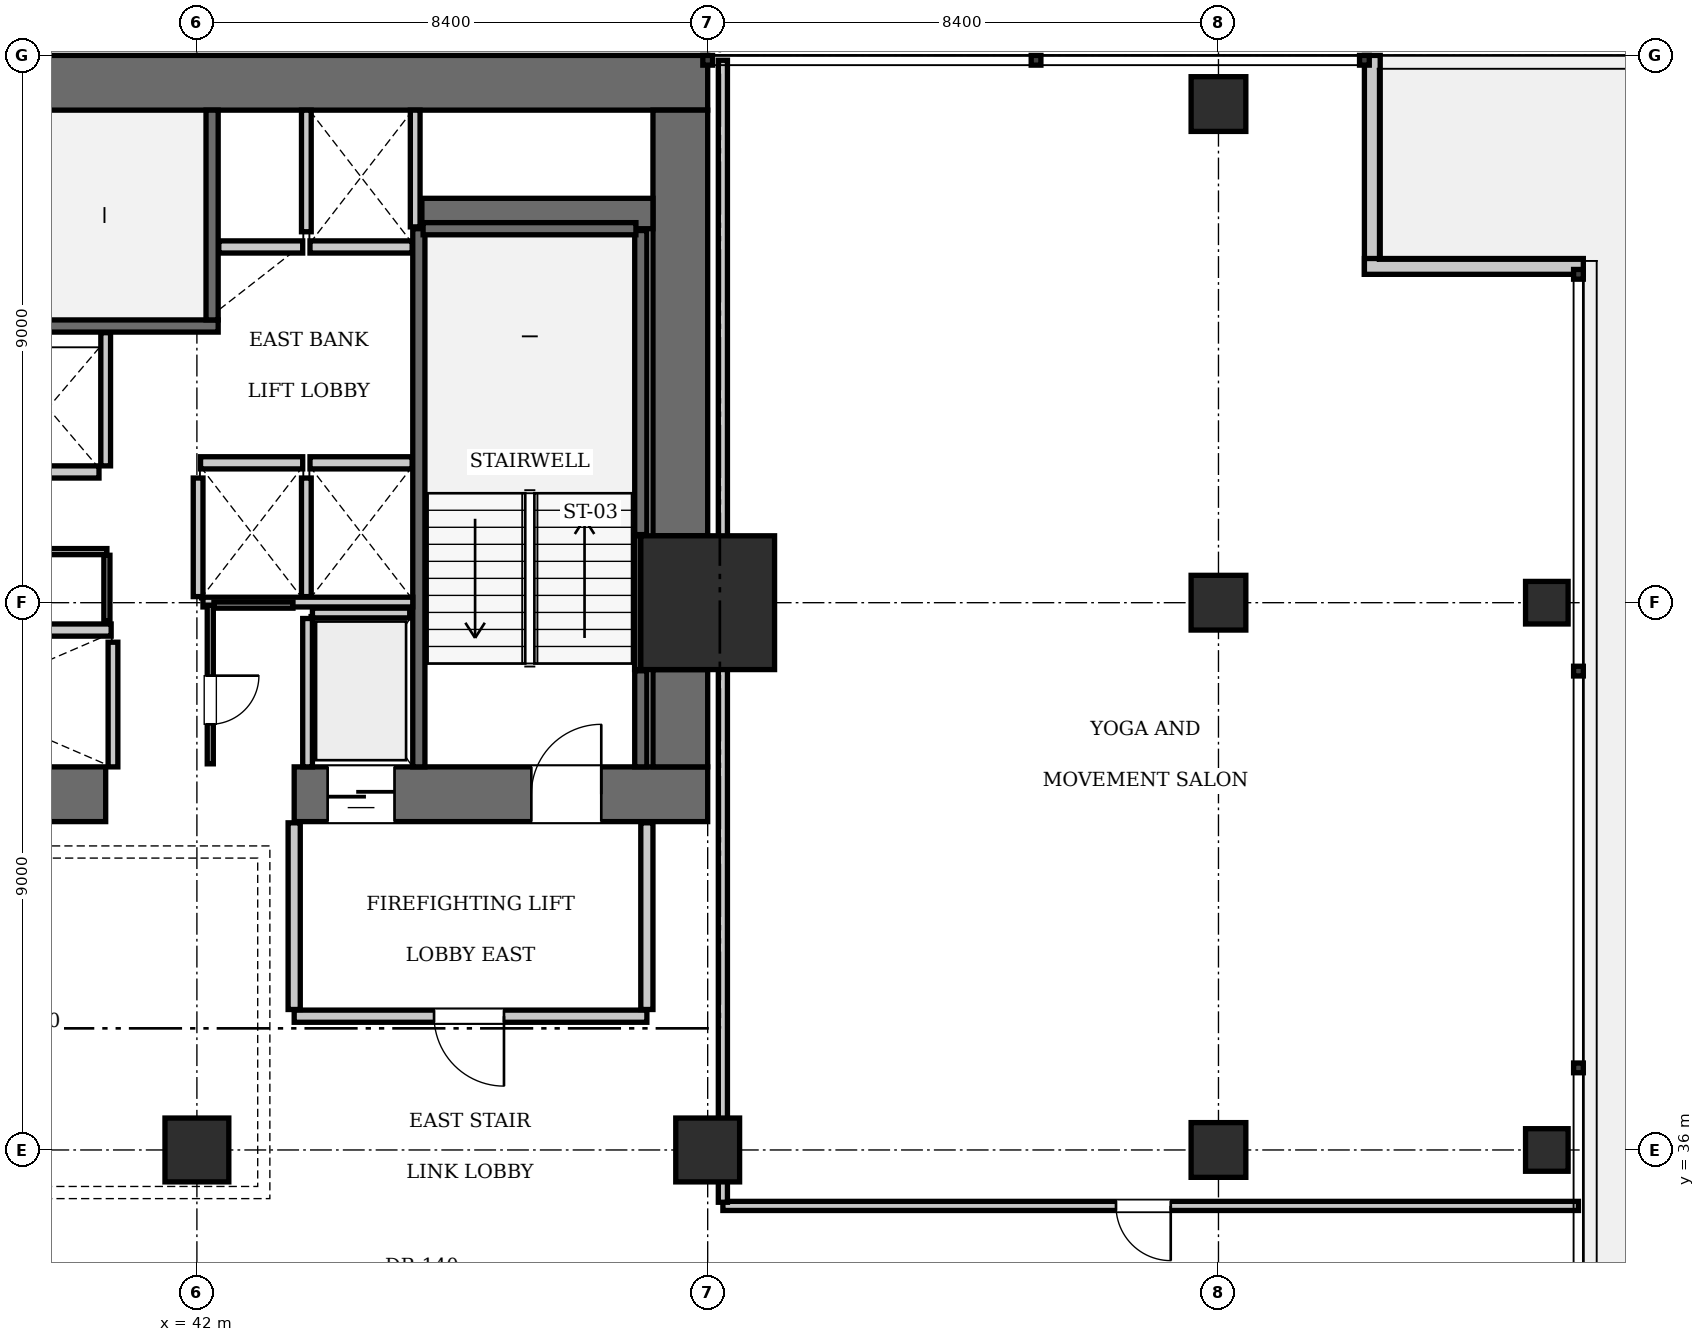
"""IFC4 building model, lengths in metres.
Left out: names, types, materials, properties, quantities, classifications, styles, units other than length and angle.
Written with IfcOpenShell. Run it as: python <this file> out.ifc"""

import sys

from ifc_helpers import new_model, si_unit, direction, frame, frame_2d, origin, origin_2d, place, context, subcontext, project, spatial, rectangle, i_section, extrude, element, fill, save


model = new_model("IFC4")
c1 = context("Model", 3, precision=1e-05, world=origin(), true_north=direction((0.0, 1.0)))
c2 = subcontext(c1, "Body", "Model", "MODEL_VIEW")
j1 = project(units=[si_unit("LENGTHUNIT", "METRE"), si_unit("PLANEANGLEUNIT", "RADIAN")], contexts=[c1])
p1 = place(None, origin())
s1 = spatial("IfcSite", under=j1, at=p1, CompositionType="ELEMENT")
p2 = place(p1, origin())
s2 = spatial("IfcBuilding", under=s1, at=p2, CompositionType="ELEMENT")
p3 = place(p2, frame((0.0, 0.0, 26.95)))
s3 = spatial("IfcBuildingStorey", under=s2, at=p3, CompositionType="ELEMENT", Elevation=26.95)
p4 = place(p3, frame((50.4, 45.0, 0.0), z_axis=(0.0, 0.0, 1.0), x_axis=(1.0, 0.0, 0.0)))
e1 = element("IfcColumn", 1, at=p4, inside=s3, PredefinedType="COLUMN", context=c2, shape_type="SweptSolid", body=[
    extrude(rectangle(XDim=2.2, YDim=2.2, at=origin_2d()), origin(), (0.0, 0.0, 1.0), 3.85),
])
p5 = place(p3, frame((25.2, 53.55, 0.0), z_axis=(0.0, 0.0, 1.0), x_axis=(1.0, 0.0, 0.0)))
e2 = element("IfcWall", 2, at=p5, inside=s3, PredefinedType="SHEAR", context=c2, shape_type="SweptSolid", body=[
    extrude(rectangle(XDim=25.2, YDim=0.9, at=frame_2d((12.6, 0.0))), origin(), (0.0, 0.0, 1.0), 3.85),
])
p6 = place(p3, frame((35.1, 41.85, 0.0), z_axis=(0.0, 0.0, 1.0), x_axis=(1.0, 0.0, 0.0)))
e3 = element("IfcWall", 3, at=p6, inside=s3, PredefinedType="SHEAR", context=c2, shape_type="SweptSolid", body=[
    extrude(rectangle(XDim=5.4, YDim=0.9, at=frame_2d((2.7, 0.0))), origin(), (0.0, 0.0, 1.0), 3.85),
])
p7 = place(p3, frame((43.6, 41.85, 0.0), z_axis=(0.0, 0.0, 1.0), x_axis=(1.0, 0.0, 0.0)))
e4 = element("IfcWall", 4, at=p7, inside=s3, PredefinedType="SHEAR", context=c2, shape_type="SweptSolid", body=[
    extrude(rectangle(XDim=6.8, YDim=0.9, at=frame_2d((3.4, 0.0))), origin(), (0.0, 0.0, 1.0), 3.85),
])
p8 = place(p7, frame((3.9, 0.0, 0.0)))
e5 = element("IfcOpeningElement", 5, at=p8, cuts=e4, PredefinedType="OPENING", context=c2, shape_type="SweptSolid", body=[
    extrude(rectangle(XDim=1.15, YDim=2.15, at=frame_2d((0.575, 1.075))), frame((0.0, 0.46, 0.0), z_axis=(0.0, -1.0, 0.0), x_axis=(1.0, 0.0, 0.0)), (0.0, 0.0, 1.0), 0.92),
])
p9 = place(p7, frame((0.55, 0.0, 0.0)))
e6 = element("IfcOpeningElement", 6, at=p9, cuts=e4, PredefinedType="OPENING", context=c2, shape_type="SweptSolid", body=[
    extrude(rectangle(XDim=1.1, YDim=2.2, at=frame_2d((0.55, 1.1))), frame((0.0, 0.46, 0.0), z_axis=(0.0, -1.0, 0.0), x_axis=(1.0, 0.0, 0.0)), (0.0, 0.0, 1.0), 0.92),
])
p10 = place(p3, frame((49.95, 42.3, 0.0), z_axis=(0.0, 0.0, 1.0), x_axis=(0.0, 1.0, 0.0)))
e7 = element("IfcWall", 7, at=p10, inside=s3, PredefinedType="SHEAR", context=c2, shape_type="SweptSolid", body=[
    extrude(rectangle(XDim=1.6, YDim=0.9, at=frame_2d((0.8, 0.0))), origin(), (0.0, 0.0, 1.0), 3.85),
])
p11 = place(p3, frame((49.95, 46.1, 0.0), z_axis=(0.0, 0.0, 1.0), x_axis=(0.0, 1.0, 0.0)))
e8 = element("IfcWall", 8, at=p11, inside=s3, PredefinedType="SHEAR", context=c2, shape_type="SweptSolid", body=[
    extrude(rectangle(XDim=7.0, YDim=0.9, at=frame_2d((3.5, 0.0))), origin(), (0.0, 0.0, 1.0), 3.85),
])
p12 = place(p3, frame((45.7, 51.4, 0.0), z_axis=(0.0, 0.0, 1.0), x_axis=(1.0, 0.0, 0.0)))
e9 = element("IfcWall", 9, at=p12, inside=s3, PredefinedType="SHEAR", context=c2, shape_type="SweptSolid", body=[
    extrude(rectangle(XDim=3.8, YDim=0.5, at=frame_2d((1.9, 0.0))), origin(), (0.0, 0.0, 1.0), 3.85),
])
for number, where, z_axis, x_axis in (
    (10, (42.0, 36.0, 0.0), (0.0, 0.0, 1.0), (1.0, 0.0, 0.0)),
    (11, (50.4, 36.0, 0.0), (0.0, 0.0, 1.0), (1.0, 0.0, 0.0)),
):
    element("IfcColumn", number, at=place(p3, frame(where, z_axis=z_axis, x_axis=x_axis)), inside=s3, PredefinedType="COLUMN", context=c2, shape_type="SweptSolid", body=[
        extrude(rectangle(XDim=1.05, YDim=1.05, at=origin_2d()), origin(), (0.0, 0.0, 1.0), 3.85),
    ])
for number, where, z_axis, x_axis in (
    (12, (58.8, 36.0, 0.0), (0.0, 0.0, 1.0), (1.0, 0.0, 0.0)),
    (13, (58.8, 45.0, 0.0), (0.0, 0.0, 1.0), (1.0, 0.0, 0.0)),
    (14, (58.8, 53.2, 0.0), (0.0, 0.0, 1.0), (1.0, 0.0, 0.0)),
):
    element("IfcColumn", number, at=place(p3, frame(where, z_axis=z_axis, x_axis=x_axis)), inside=s3, PredefinedType="COLUMN", context=c2, shape_type="SweptSolid", body=[
        extrude(rectangle(XDim=0.9, YDim=0.9, at=origin_2d()), origin(), (0.0, 0.0, 1.0), 3.85),
    ])
for number, where, z_axis, x_axis in (
    (15, (64.2, 36.0, -0.24), (0.0, 0.0, 1.0), (1.0, 0.0, 0.0)),
    (16, (64.2, 45.0, -0.24), (0.0, 0.0, 1.0), (1.0, 0.0, 0.0)),
):
    element("IfcColumn", number, at=place(p3, frame(where, z_axis=z_axis, x_axis=x_axis)), inside=s3, PredefinedType="COLUMN", context=c2, shape_type="SweptSolid", body=[
        extrude(i_section(OverallWidth=0.7, OverallDepth=0.7, WebThickness=0.028, FlangeThickness=0.044, at=origin_2d()), origin(), (0.0, 0.0, 1.0), 4.09),
    ])
p13 = place(p3, frame((33.25, 49.55, 0.0), z_axis=(0.0, 0.0, 1.0), x_axis=(1.0, 0.0, 0.0)))
e17 = element("IfcWall", 17, at=p13, inside=s3, PredefinedType="SOLIDWALL", context=c2, shape_type="SweptSolid", body=[
    extrude(rectangle(XDim=9.1, YDim=0.2, at=frame_2d((4.55, 0.0))), origin(), (0.0, 0.0, 1.0), 3.61),
])
p14 = place(p3, frame((42.25, 49.65, 0.0), z_axis=(0.0, 0.0, 1.0), x_axis=(0.0, 1.0, 0.0)))
e18 = element("IfcWall", 18, at=p14, inside=s3, PredefinedType="SOLIDWALL", context=c2, shape_type="SweptSolid", body=[
    extrude(rectangle(XDim=3.45, YDim=0.2, at=frame_2d((1.725, 0.0))), origin(), (0.0, 0.0, 1.0), 3.61),
])
p15 = place(p3, frame((45.65, 42.3, 0.0), z_axis=(0.0, 0.0, 1.0), x_axis=(0.0, 1.0, 0.0)))
e19 = element("IfcWall", 19, at=p15, inside=s3, PredefinedType="SOLIDWALL", context=c2, shape_type="SweptSolid", body=[
    extrude(rectangle(XDim=8.85, YDim=0.2, at=frame_2d((4.425, 0.0))), origin(), (0.0, 0.0, 1.0), 3.61),
])
p16 = place(p3, frame((49.3, 42.3, 0.0), z_axis=(0.0, 0.0, 1.0), x_axis=(0.0, 1.0, 0.0)))
e20 = element("IfcWall", 20, at=p16, inside=s3, PredefinedType="SOLIDWALL", context=c2, shape_type="SweptSolid", body=[
    extrude(rectangle(XDim=1.58, YDim=0.2, at=frame_2d((0.79, 0.0))), origin(), (0.0, 0.0, 1.0), 3.61),
])
p17 = place(p3, frame((49.3, 46.12, 0.0), z_axis=(0.0, 0.0, 1.0), x_axis=(0.0, 1.0, 0.0)))
e21 = element("IfcWall", 21, at=p17, inside=s3, PredefinedType="SOLIDWALL", context=c2, shape_type="SweptSolid", body=[
    extrude(rectangle(XDim=5.0, YDim=0.2, at=frame_2d((2.5, 0.0))), origin(), (0.0, 0.0, 1.0), 3.61),
])
p18 = place(p3, frame((45.72, 51.15, 0.0), z_axis=(0.0, 0.0, 1.0), x_axis=(1.0, 0.0, 0.0)))
e22 = element("IfcWall", 22, at=p18, inside=s3, PredefinedType="SOLIDWALL", context=c2, shape_type="SweptSolid", body=[
    extrude(rectangle(XDim=3.5, YDim=0.2, at=frame_2d((1.75, 0.0))), origin(), (0.0, 0.0, 1.0), 3.61),
])
p19 = place(p3, frame((49.248, 43.9, 0.0), z_axis=(0.0, 0.0, 1.0), x_axis=(0.0, 1.0, 0.0)))
e23 = element("IfcWall", 23, at=p19, inside=s3, PredefinedType="SOLIDWALL", context=c2, shape_type="SweptSolid", body=[
    extrude(rectangle(XDim=2.2, YDim=0.1, at=frame_2d((1.1, 0.0))), origin(), (0.0, 0.0, 1.0), 3.61),
])
for number, where, z_axis, x_axis in (
    (24, (42.06, 47.3, 0.0), (0.0, 0.0, 1.0), (1.0, 0.0, 0.0)),
    (25, (43.86, 47.3, 0.0), (0.0, 0.0, 1.0), (1.0, 0.0, 0.0)),
):
    element("IfcWall", number, at=place(p3, frame(where, z_axis=z_axis, x_axis=x_axis)), inside=s3, PredefinedType="SOLIDWALL", context=c2, shape_type="SweptSolid", body=[
        extrude(rectangle(XDim=1.68, YDim=0.2, at=frame_2d((0.84, 0.0))), origin(), (0.0, 0.0, 1.0), 3.61),
    ])
p20 = place(p3, frame((42.36, 50.85, 0.0), z_axis=(0.0, 0.0, 1.0), x_axis=(1.0, 0.0, 0.0)))
e26 = element("IfcWall", 26, at=p20, inside=s3, PredefinedType="SOLIDWALL", context=c2, shape_type="SweptSolid", body=[
    extrude(rectangle(XDim=1.38, YDim=0.2, at=frame_2d((0.69, 0.0))), origin(), (0.0, 0.0, 1.0), 3.61),
])
p21 = place(p3, frame((43.86, 50.85, 0.0), z_axis=(0.0, 0.0, 1.0), x_axis=(1.0, 0.0, 0.0)))
e27 = element("IfcWall", 27, at=p21, inside=s3, PredefinedType="SOLIDWALL", context=c2, shape_type="SweptSolid", body=[
    extrude(rectangle(XDim=1.68, YDim=0.2, at=frame_2d((0.84, 0.0))), origin(), (0.0, 0.0, 1.0), 3.61),
])
p22 = place(p3, frame((38.91, 44.55, 0.0), z_axis=(0.0, 0.0, 1.0), x_axis=(1.0, 0.0, 0.0)))
e28 = element("IfcWall", 28, at=p22, inside=s3, PredefinedType="SOLIDWALL", context=c2, shape_type="SweptSolid", body=[
    extrude(rectangle(XDim=1.68, YDim=0.2, at=frame_2d((0.84, 0.0))), origin(), (0.0, 0.0, 1.0), 3.61),
])
p23 = place(p3, frame((38.71, 47.15, 0.0), z_axis=(0.0, 0.0, 1.0), x_axis=(1.0, 0.0, 0.0)))
e29 = element("IfcWall", 29, at=p23, inside=s3, PredefinedType="SOLIDWALL", context=c2, shape_type="SweptSolid", body=[
    extrude(rectangle(XDim=1.68, YDim=0.2, at=frame_2d((0.84, 0.0))), origin(), (0.0, 0.0, 1.0), 3.61),
])
p24 = place(p3, frame((43.9, 44.83, 0.0), z_axis=(0.0, 0.0, 1.0), x_axis=(1.0, 0.0, 0.0)))
e30 = element("IfcWall", 30, at=p24, inside=s3, PredefinedType="SOLIDWALL", context=c2, shape_type="SweptSolid", body=[
    extrude(rectangle(XDim=1.6, YDim=0.16, at=frame_2d((0.8, 0.0))), origin(), (0.0, 0.0, 1.0), 3.61),
])
p25 = place(p3, frame((43.82, 42.3, 0.0), z_axis=(0.0, 0.0, 1.0), x_axis=(0.0, 1.0, 0.0)))
e31 = element("IfcWall", 31, at=p25, inside=s3, PredefinedType="SOLIDWALL", context=c2, shape_type="SweptSolid", body=[
    extrude(rectangle(XDim=2.44, YDim=0.16, at=frame_2d((1.22, 0.0))), origin(), (0.0, 0.0, 1.0), 3.61),
])
for number, where, z_axis, x_axis in (
    (32, (42.02, 45.1, 0.0), (0.0, 0.0, 1.0), (0.0, 1.0, 0.0)),
    (33, (43.8, 45.1, 0.0), (0.0, 0.0, 1.0), (0.0, 1.0, 0.0)),
):
    element("IfcWall", number, at=place(p3, frame(where, z_axis=z_axis, x_axis=x_axis)), inside=s3, PredefinedType="SOLIDWALL", context=c2, shape_type="SweptSolid", body=[
        extrude(rectangle(XDim=1.95, YDim=0.16, at=frame_2d((0.975, 0.0))), origin(), (0.0, 0.0, 1.0), 3.61),
    ])
p26 = place(p3, frame((42.1, 45.01, 0.0), z_axis=(0.0, 0.0, 1.0), x_axis=(1.0, 0.0, 0.0)))
e34 = element("IfcWall", 34, at=p26, inside=s3, PredefinedType="SOLIDWALL", context=c2, shape_type="SweptSolid", body=[
    extrude(rectangle(XDim=3.45, YDim=0.16, at=frame_2d((1.725, 0.0))), origin(), (0.0, 0.0, 1.0), 3.61),
])
p27 = place(p3, frame((45.59, 51.18, 0.0), z_axis=(0.0, 0.0, 1.0), x_axis=(0.0, 1.0, 0.0)))
e35 = element("IfcWall", 35, at=p27, inside=s3, PredefinedType="SOLIDWALL", context=c2, shape_type="SweptSolid", body=[
    extrude(rectangle(XDim=1.92, YDim=0.16, at=frame_2d((0.96, 0.0))), origin(), (0.0, 0.0, 1.0), 3.61),
])
p28 = place(p3, frame((43.8, 51.1, 0.0), z_axis=(0.0, 0.0, 1.0), x_axis=(0.0, 1.0, 0.0)))
e36 = element("IfcWall", 36, at=p28, inside=s3, PredefinedType="SOLIDWALL", context=c2, shape_type="SweptSolid", body=[
    extrude(rectangle(XDim=2.0, YDim=0.16, at=frame_2d((1.0, 0.0))), origin(), (0.0, 0.0, 1.0), 3.61),
])
p29 = place(p3, frame((40.62, 42.3, 0.0), z_axis=(0.0, 0.0, 1.0), x_axis=(0.0, 1.0, 0.0)))
e37 = element("IfcWall", 37, at=p29, inside=s3, PredefinedType="SOLIDWALL", context=c2, shape_type="SweptSolid", body=[
    extrude(rectangle(XDim=2.05, YDim=0.16, at=frame_2d((1.025, 0.0))), origin(), (0.0, 0.0, 1.0), 3.61),
])
p30 = place(p3, frame((40.5, 47.25, 0.0), z_axis=(0.0, 0.0, 1.0), x_axis=(0.0, 1.0, 0.0)))
e38 = element("IfcWall", 38, at=p30, inside=s3, PredefinedType="SOLIDWALL", context=c2, shape_type="SweptSolid", body=[
    extrude(rectangle(XDim=2.19, YDim=0.16, at=frame_2d((1.095, 0.0))), origin(), (0.0, 0.0, 1.0), 3.61),
])
for number, where, z_axis, x_axis in (
    (39, (61.33, 54.0, 0.0), (0.0, 0.0, 1.0), (0.0, -1.0, 0.0)),
    (40, (61.2, 50.53, 0.0), (0.0, 0.0, 1.0), (1.0, 0.0, 0.0)),
):
    element("IfcWall", number, at=place(p3, frame(where, z_axis=z_axis, x_axis=x_axis)), inside=s3, PredefinedType="SOLIDWALL", context=c2, shape_type="SweptSolid", body=[
        extrude(rectangle(XDim=3.6, YDim=0.26, at=frame_2d((1.8, 0.0))), origin(), (0.0, 0.0, 1.0), 3.61),
    ])
p31 = place(p3, frame((43.6, 38.2, 0.0), z_axis=(0.0, 0.0, 1.0), x_axis=(1.0, 0.0, 0.0)))
e41 = element("IfcWall", 41, at=p31, inside=s3, PredefinedType="PARTITIONING", context=c2, shape_type="SweptSolid", body=[
    extrude(rectangle(XDim=5.8, YDim=0.2, at=frame_2d((2.9, 0.0))), origin(), (0.0, 0.0, 1.0), 3.61),
])
p32 = place(p31, frame((2.3, 0.0, 0.0)))
e42 = element("IfcOpeningElement", 42, at=p32, cuts=e41, PredefinedType="OPENING", context=c2, shape_type="SweptSolid", body=[
    extrude(rectangle(XDim=1.15, YDim=2.15, at=frame_2d((0.575, 1.075))), frame((0.0, 0.11, 0.0), z_axis=(0.0, -1.0, 0.0), x_axis=(1.0, 0.0, 0.0)), (0.0, 0.0, 1.0), 0.22),
])
for number, where, z_axis, x_axis in (
    (43, (43.6, 38.31, 0.0), (0.0, 0.0, 1.0), (0.0, 1.0, 0.0)),
    (44, (49.4, 38.31, 0.0), (0.0, 0.0, 1.0), (0.0, 1.0, 0.0)),
):
    element("IfcWall", number, at=place(p3, frame(where, z_axis=z_axis, x_axis=x_axis)), inside=s3, PredefinedType="PARTITIONING", context=c2, shape_type="SweptSolid", body=[
        extrude(rectangle(XDim=3.07, YDim=0.2, at=frame_2d((1.535, 0.0))), origin(), (0.0, 0.0, 1.0), 3.61),
    ])
p33 = place(p3, frame((38.02, 45.84, 0.0), z_axis=(0.0, 0.0, 1.0), x_axis=(1.0, 0.0, 0.0)))
e45 = element("IfcWall", 45, at=p33, inside=s3, PredefinedType="PARTITIONING", context=c2, shape_type="SweptSolid", body=[
    extrude(rectangle(XDim=2.5, YDim=0.1, at=frame_2d((1.25, 0.0))), origin(), (0.0, 0.0, 1.0), 3.61),
])
p34 = place(p33, frame((0.75, 0.0, 0.0)))
e46 = element("IfcOpeningElement", 46, at=p34, cuts=e45, PredefinedType="OPENING", context=c2, shape_type="SweptSolid", body=[
    extrude(rectangle(XDim=0.8, YDim=2.05, at=frame_2d((0.4, 1.025))), frame((0.0, 0.06, 0.0), z_axis=(0.0, -1.0, 0.0), x_axis=(1.0, 0.0, 0.0)), (0.0, 0.0, 1.0), 0.12),
])
p35 = place(p3, frame((40.52, 44.7, 0.0), z_axis=(0.0, 0.0, 1.0), x_axis=(0.0, 1.0, 0.0)))
e47 = element("IfcWall", 47, at=p35, inside=s3, PredefinedType="PARTITIONING", context=c2, shape_type="SweptSolid", body=[
    extrude(rectangle(XDim=1.08, YDim=0.1, at=frame_2d((0.54, 0.0))), origin(), (0.0, 0.0, 1.0), 3.61),
])
p36 = place(p3, frame((42.22, 42.35, 0.0), z_axis=(0.0, 0.0, 1.0), x_axis=(0.0, 1.0, 0.0)))
e48 = element("IfcWall", 48, at=p36, inside=s3, PredefinedType="PARTITIONING", context=c2, shape_type="SweptSolid", body=[
    extrude(rectangle(XDim=2.61, YDim=0.1, at=frame_2d((1.305, 0.0))), origin(), (0.0, 0.0, 1.0), 3.61),
])
p37 = place(p36, frame((0.65, 0.0, 0.0)))
e49 = element("IfcOpeningElement", 49, at=p37, cuts=e48, PredefinedType="OPENING", context=c2, shape_type="SweptSolid", body=[
    extrude(rectangle(XDim=0.8, YDim=2.05, at=frame_2d((0.4, 1.025))), frame((0.0, 0.06, 0.0), z_axis=(0.0, -1.0, 0.0), x_axis=(1.0, 0.0, 0.0)), (0.0, 0.0, 1.0), 0.12),
])
p38 = place(p3, frame((42.28, 44.96, 0.0), z_axis=(0.0, 0.0, 1.0), x_axis=(1.0, 0.0, 0.0)))
e50 = element("IfcWall", 50, at=p38, inside=s3, PredefinedType="PARTITIONING", context=c2, shape_type="SweptSolid", body=[
    extrude(rectangle(XDim=1.3, YDim=0.1, at=frame_2d((0.65, 0.0))), origin(), (0.0, 0.0, 1.0), 3.61),
])
p39 = place(p3, frame((50.65, 35.08, 0.0), z_axis=(0.0, 0.0, 1.0), x_axis=(1.0, 0.0, 0.0)))
e51 = element("IfcWall", 51, at=p39, inside=s3, PredefinedType="PARTITIONING", context=c2, shape_type="SweptSolid", body=[
    extrude(rectangle(XDim=14.07, YDim=0.15, at=frame_2d((7.035, 0.0))), origin(), (0.0, 0.0, 1.0), 3.61),
])
p40 = place(p39, frame((6.465, 0.0, 0.0)))
e52 = element("IfcOpeningElement", 52, at=p40, cuts=e51, PredefinedType="OPENING", context=c2, shape_type="SweptSolid", body=[
    extrude(rectangle(XDim=0.9, YDim=2.1, at=frame_2d((0.45, 1.05))), frame((0.0, 0.085, 0.0), z_axis=(0.0, -1.0, 0.0), x_axis=(1.0, 0.0, 0.0)), (0.0, 0.0, 1.0), 0.17),
])
p41 = place(p3, frame((50.65, 35.14, 0.0), z_axis=(0.0, 0.0, 1.0), x_axis=(0.0, 1.0, 0.0)))
e53 = element("IfcWall", 53, at=p41, inside=s3, PredefinedType="PARTITIONING", context=c2, shape_type="SweptSolid", body=[
    extrude(rectangle(XDim=18.78, YDim=0.15, at=frame_2d((9.39, 0.0))), origin(), (0.0, 0.0, 1.0), 3.61),
])
p42 = place(p8, origin())
e54 = element("IfcDoor", 54, at=p42, inside=s3, OperationType="SINGLE_SWING_RIGHT", PredefinedType="DOOR", context=c2, shape_type="SweptSolid", body=[
    extrude(rectangle(XDim=1.15, YDim=2.15, at=frame_2d((0.575, 1.075))), frame((0.0, 0.025, 0.0), z_axis=(0.0, -1.0, 0.0), x_axis=(1.0, 0.0, 0.0)), (0.0, 0.0, 1.0), 0.05),
])
fill(e5, e54)
p43 = place(p9, frame((1.1, 0.0, 0.0), z_axis=(0.0, 0.0, 1.0), x_axis=(-1.0, 0.0, 0.0)))
e55 = element("IfcDoor", 55, at=p43, inside=s3, OperationType="SLIDING_TO_LEFT", PredefinedType="DOOR", context=c2, shape_type="SweptSolid", body=[
    extrude(rectangle(XDim=1.1, YDim=2.2, at=frame_2d((0.55, 1.1))), frame((0.0, 0.025, 0.0), z_axis=(0.0, -1.0, 0.0), x_axis=(1.0, 0.0, 0.0)), (0.0, 0.0, 1.0), 0.05),
])
fill(e6, e55)
p44 = place(p32, frame((1.15, 0.0, 0.0), z_axis=(0.0, 0.0, 1.0), x_axis=(-1.0, 0.0, 0.0)))
e56 = element("IfcDoor", 56, at=p44, inside=s3, OperationType="SINGLE_SWING_LEFT", PredefinedType="DOOR", context=c2, shape_type="SweptSolid", body=[
    extrude(rectangle(XDim=1.15, YDim=2.15, at=frame_2d((0.575, 1.075))), frame((0.0, 0.025, 0.0), z_axis=(0.0, -1.0, 0.0), x_axis=(1.0, 0.0, 0.0)), (0.0, 0.0, 1.0), 0.05),
])
fill(e42, e56)
p45 = place(p37, frame((0.8, 0.0, 0.0), z_axis=(0.0, 0.0, 1.0), x_axis=(-1.0, 0.0, 0.0)))
e57 = element("IfcDoor", 57, at=p45, inside=s3, OperationType="SINGLE_SWING_LEFT", PredefinedType="DOOR", context=c2, shape_type="SweptSolid", body=[
    extrude(rectangle(XDim=0.8, YDim=2.05, at=frame_2d((0.4, 1.025))), frame((0.0, 0.025, 0.0), z_axis=(0.0, -1.0, 0.0), x_axis=(1.0, 0.0, 0.0)), (0.0, 0.0, 1.0), 0.05),
])
fill(e49, e57)
p46 = place(p40, frame((0.9, 0.0, 0.0), z_axis=(0.0, 0.0, 1.0), x_axis=(-1.0, 0.0, 0.0)))
e58 = element("IfcDoor", 58, at=p46, inside=s3, OperationType="SINGLE_SWING_LEFT", PredefinedType="DOOR", context=c2, shape_type="SweptSolid", body=[
    extrude(rectangle(XDim=0.9, YDim=2.1, at=frame_2d((0.45, 1.05))), frame((0.0, 0.025, 0.0), z_axis=(0.0, -1.0, 0.0), x_axis=(1.0, 0.0, 0.0)), (0.0, 0.0, 1.0), 0.05),
])
fill(e52, e58)
save(model, sys.argv[1])
